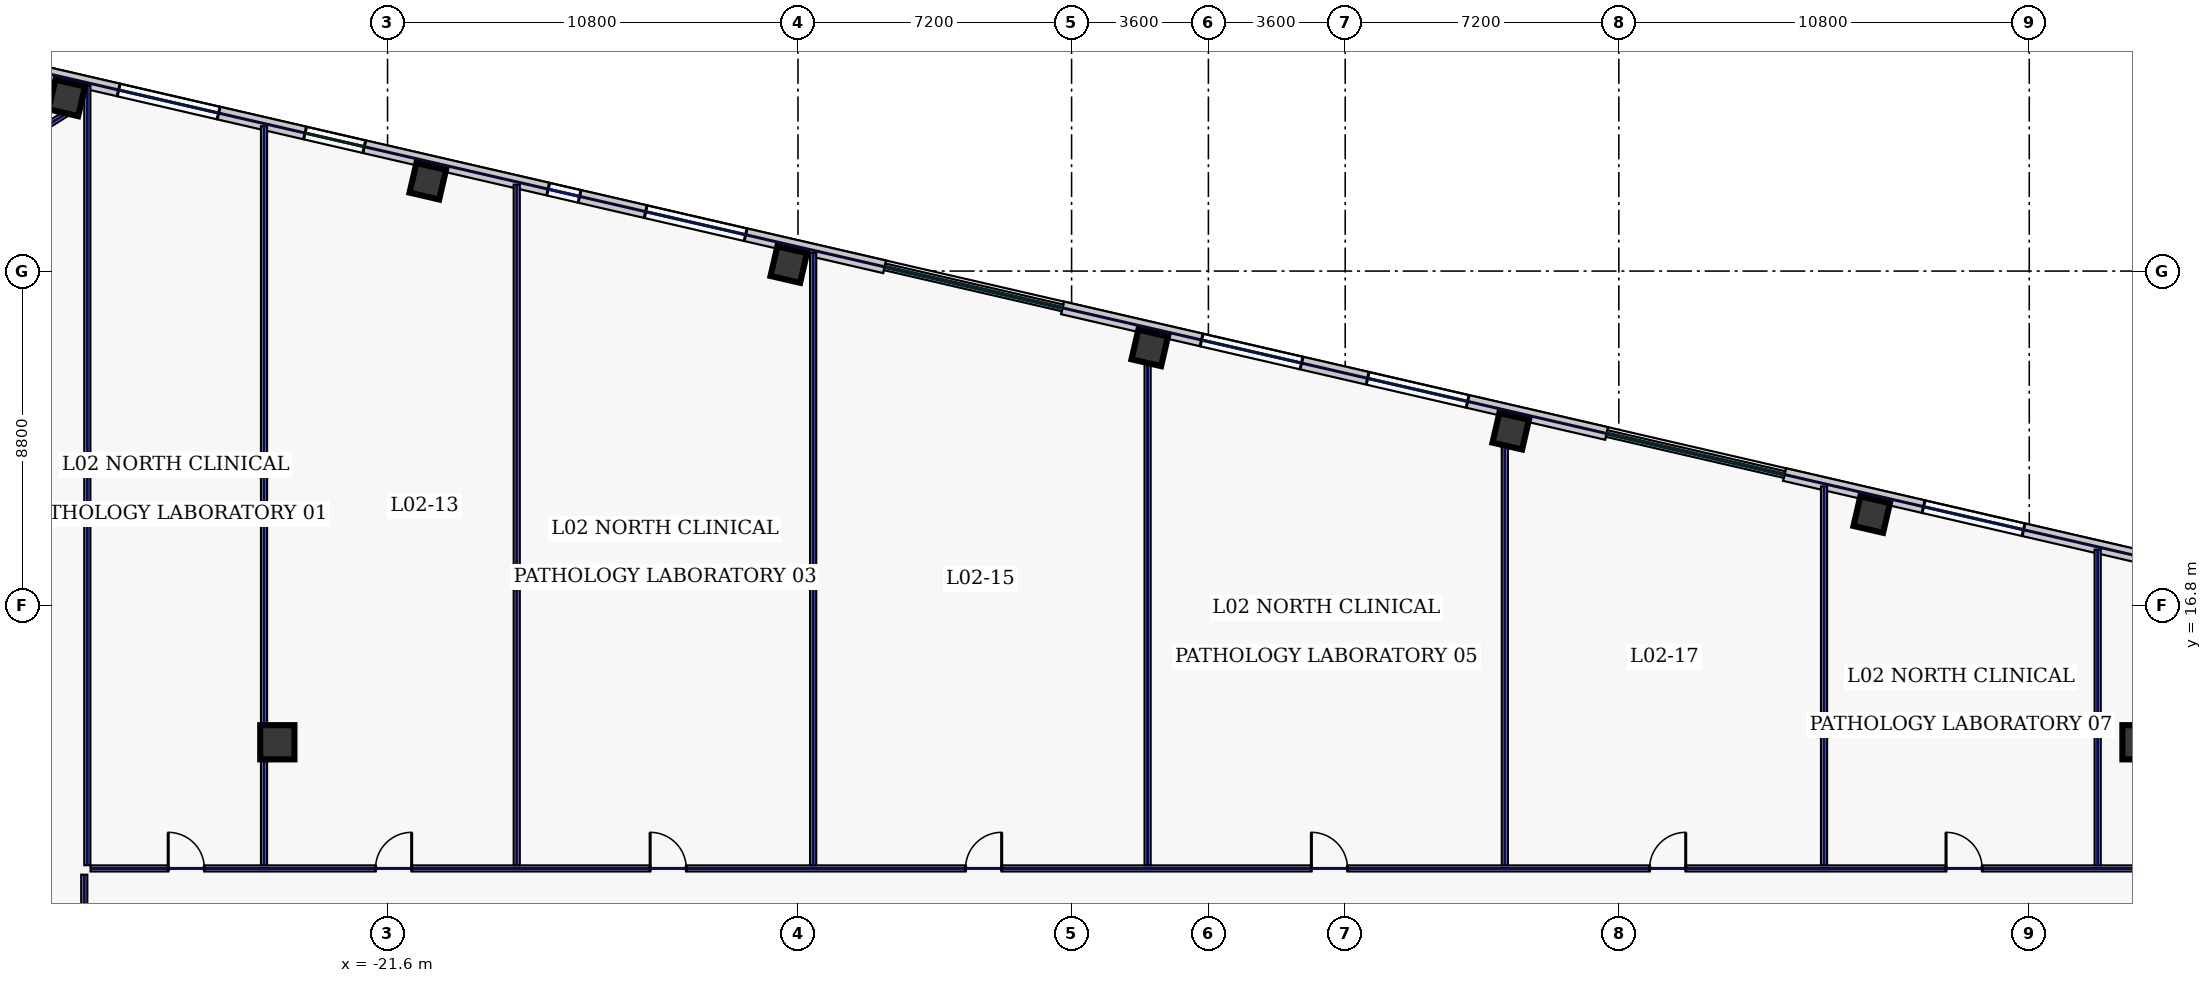
"""IFC4 building model, lengths in metres.
Left out: names, types, materials, properties, quantities, classifications, styles, units other than length and angle.
Written with IfcOpenShell. Run it as: python <this file> out.ifc"""

import sys

from ifc_helpers import new_model, si_unit, direction, frame, frame_2d, origin, origin_2d, place, context, subcontext, project, spatial, rectangle, hollow_rectangle, extrude, element, fill, save


model = new_model("IFC4")
c1 = context("Model", 3, precision=1e-05, world=origin(), true_north=direction((0.0, 1.0)))
c2 = subcontext(c1, "Body", "Model", "MODEL_VIEW")
j1 = project(units=[si_unit("LENGTHUNIT", "METRE"), si_unit("PLANEANGLEUNIT", "RADIAN")], contexts=[c1])
p1 = place(None, origin())
s1 = spatial("IfcSite", under=j1, at=p1, CompositionType="ELEMENT")
p2 = place(p1, origin())
s2 = spatial("IfcBuilding", under=s1, at=p2, CompositionType="ELEMENT")
p3 = place(p2, frame((0.0, 0.0, 13.4)))
s3 = spatial("IfcBuildingStorey", under=s2, at=p3, CompositionType="ELEMENT", Elevation=13.4)
for number, where, z_axis, x_axis in (
    (1, (-24.5, 13.2, 0.0), (0.0, 0.0, 1.0), (1.0, 0.0, 0.0)),
    (2, (24.5, 13.2, 0.0), (0.0, 0.0, 1.0), (1.0, 0.0, 0.0)),
):
    element("IfcColumn", number, at=place(p3, frame(where, z_axis=z_axis, x_axis=x_axis)), inside=s3, PredefinedType="COLUMN", context=c2, shape_type="SweptSolid", body=[
        extrude(hollow_rectangle(XDim=0.9, YDim=0.9, WallThickness=0.04, at=origin_2d()), origin(), (0.0, 0.0, 1.0), 4.7),
    ])
for number, where, z_axis, x_axis in (
    (3, (17.454, 19.192, 0.0), (0.0, 0.0, 1.0), (0.974, -0.225, 0.0)),
    (4, (7.955, 21.385, 0.0), (0.0, 0.0, 1.0), (0.974, -0.225, 0.0)),
    (5, (-1.544, 23.578, 0.0), (0.0, 0.0, 1.0), (0.974, -0.225, 0.0)),
    (6, (-11.042, 25.771, 0.0), (0.0, 0.0, 1.0), (0.974, -0.225, 0.0)),
    (7, (-20.541, 27.964, 0.0), (0.0, 0.0, 1.0), (0.974, -0.225, 0.0)),
    (8, (-30.04, 30.156, 0.0), (0.0, 0.0, 1.0), (0.974, -0.225, 0.0)),
):
    element("IfcColumn", number, at=place(p3, frame(where, z_axis=z_axis, x_axis=x_axis)), inside=s3, PredefinedType="COLUMN", context=c2, shape_type="SweptSolid", body=[
        extrude(hollow_rectangle(XDim=0.8, YDim=0.8, WallThickness=0.036, at=origin_2d()), origin(), (0.0, 0.0, 1.0), 4.7),
    ])
p4 = place(p3, frame((37.229, 15.15, 0.0), z_axis=(0.0, 0.0, 1.0), x_axis=(-0.97436993772, 0.224951604723, 0.0)))
e9 = element("IfcWall", 9, at=p4, inside=s3, PredefinedType="STANDARD", context=c2, shape_type="SweptSolid", body=[
    extrude(rectangle(XDim=22.651, YDim=0.34, at=frame_2d((11.326, 0.0))), origin(), (0.0, 0.0, 1.0), 4.7),
])
p5 = place(p4, frame((16.195, 0.0, 0.9)))
e10 = element("IfcOpeningElement", 10, at=p5, cuts=e9, PredefinedType="OPENING", context=c2, shape_type="SweptSolid", body=[
    extrude(rectangle(XDim=2.7, YDim=2.2, at=frame_2d((1.35, 1.1))), frame((0.0, 0.18, 0.0), z_axis=(0.0, -1.0, 0.0), x_axis=(1.0, 0.0, 0.0)), (0.0, 0.0, 1.0), 0.36),
])
p6 = place(p4, frame((11.711, 0.0, 0.9)))
e11 = element("IfcOpeningElement", 11, at=p6, cuts=e9, PredefinedType="OPENING", context=c2, shape_type="SweptSolid", body=[
    extrude(rectangle(XDim=0.85, YDim=1.85, at=frame_2d((0.425, 0.925))), frame((0.0, 0.18, 0.0), z_axis=(0.0, -1.0, 0.0), x_axis=(1.0, 0.0, 0.0)), (0.0, 0.0, 1.0), 0.36),
])
p7 = place(p4, frame((6.447, 0.0, 0.9)))
e12 = element("IfcOpeningElement", 12, at=p7, cuts=e9, PredefinedType="OPENING", context=c2, shape_type="SweptSolid", body=[
    extrude(rectangle(XDim=0.85, YDim=1.85, at=frame_2d((0.425, 0.925))), frame((0.0, 0.18, 0.0), z_axis=(0.0, -1.0, 0.0), x_axis=(1.0, 0.0, 0.0)), (0.0, 0.0, 1.0), 0.36),
])
p8 = place(p4, frame((1.962, 0.0, 0.9)))
e13 = element("IfcOpeningElement", 13, at=p8, cuts=e9, PredefinedType="OPENING", context=c2, shape_type="SweptSolid", body=[
    extrude(rectangle(XDim=2.7, YDim=2.2, at=frame_2d((1.35, 1.1))), frame((0.0, 0.18, 0.0), z_axis=(0.0, -1.0, 0.0), x_axis=(1.0, 0.0, 0.0)), (0.0, 0.0, 1.0), 0.36),
])
p9 = place(p3, frame((10.481, 21.325, 0.0), z_axis=(0.0, 0.0, 1.0), x_axis=(-0.974369353393, 0.2249541357, 0.0)))
e14 = element("IfcWall", 14, at=p9, inside=s3, PredefinedType="STANDARD", context=c2, shape_type="SweptSolid", body=[
    extrude(rectangle(XDim=14.697, YDim=0.34, at=frame_2d((7.349, 0.0))), origin(), (0.0, 0.0, 1.0), 4.7),
])
p10 = place(p9, frame((8.241, 0.0, 0.9)))
e15 = element("IfcOpeningElement", 15, at=p10, cuts=e14, PredefinedType="OPENING", context=c2, shape_type="SweptSolid", body=[
    extrude(rectangle(XDim=2.7, YDim=2.2, at=frame_2d((1.35, 1.1))), frame((0.0, 0.18, 0.0), z_axis=(0.0, -1.0, 0.0), x_axis=(1.0, 0.0, 0.0)), (0.0, 0.0, 1.0), 0.36),
])
p11 = place(p9, frame((3.756, 0.0, 0.9)))
e16 = element("IfcOpeningElement", 16, at=p11, cuts=e14, PredefinedType="OPENING", context=c2, shape_type="SweptSolid", body=[
    extrude(rectangle(XDim=2.7, YDim=2.2, at=frame_2d((1.35, 1.1))), frame((0.0, 0.18, 0.0), z_axis=(0.0, -1.0, 0.0), x_axis=(1.0, 0.0, 0.0)), (0.0, 0.0, 1.0), 0.36),
])
p12 = place(p3, frame((-8.517, 25.711, 0.0), z_axis=(0.0, 0.0, 1.0), x_axis=(-0.974372845456, 0.224939009598, 0.0)))
e17 = element("IfcWall", 17, at=p12, inside=s3, PredefinedType="STANDARD", context=c2, shape_type="SweptSolid", body=[
    extrude(rectangle(XDim=22.652, YDim=0.34, at=frame_2d((11.326, 0.0))), origin(), (0.0, 0.0, 1.0), 4.7),
])
p13 = place(p12, frame((17.989, 0.0, 0.9)))
e18 = element("IfcOpeningElement", 18, at=p13, cuts=e17, PredefinedType="OPENING", context=c2, shape_type="SweptSolid", body=[
    extrude(rectangle(XDim=2.7, YDim=2.2, at=frame_2d((1.35, 1.1))), frame((0.0, 0.18, 0.0), z_axis=(0.0, -1.0, 0.0), x_axis=(1.0, 0.0, 0.0)), (0.0, 0.0, 1.0), 0.36),
])
p14 = place(p12, frame((14.055, 0.0, 0.22)))
e19 = element("IfcOpeningElement", 19, at=p14, cuts=e17, PredefinedType="OPENING", context=c2, shape_type="SweptSolid", body=[
    extrude(rectangle(XDim=1.6, YDim=1.2, at=frame_2d((0.8, 0.6))), frame((0.0, 0.18, 0.0), z_axis=(0.0, -1.0, 0.0), x_axis=(1.0, 0.0, 0.0)), (0.0, 0.0, 1.0), 0.36),
])
p15 = place(p12, frame((8.241, 0.0, 0.9)))
e20 = element("IfcOpeningElement", 20, at=p15, cuts=e17, PredefinedType="OPENING", context=c2, shape_type="SweptSolid", body=[
    extrude(rectangle(XDim=0.85, YDim=1.85, at=frame_2d((0.425, 0.925))), frame((0.0, 0.18, 0.0), z_axis=(0.0, -1.0, 0.0), x_axis=(1.0, 0.0, 0.0)), (0.0, 0.0, 1.0), 0.36),
])
p16 = place(p12, frame((3.756, 0.0, 0.9)))
e21 = element("IfcOpeningElement", 21, at=p16, cuts=e17, PredefinedType="OPENING", context=c2, shape_type="SweptSolid", body=[
    extrude(rectangle(XDim=2.7, YDim=2.2, at=frame_2d((1.35, 1.1))), frame((0.0, 0.18, 0.0), z_axis=(0.0, -1.0, 0.0), x_axis=(1.0, 0.0, 0.0)), (0.0, 0.0, 1.0), 0.36),
])
p17 = place(p3, frame((-29.86, 29.868, 0.0), z_axis=(0.0, 0.0, 1.0), x_axis=(-0.848043064089, -0.529927317139, 0.0)))
e22 = element("IfcWall", 22, at=p17, inside=s3, PredefinedType="PARTITIONING", context=c2, shape_type="SweptSolid", body=[
    extrude(rectangle(XDim=7.354, YDim=0.16, at=frame_2d((3.677, 0.0))), origin(), (0.0, 0.0, 1.0), 4.7),
])
p18 = place(p3, frame((-29.58, -9.715, 0.0), z_axis=(0.0, 0.0, 1.0), x_axis=(0.0, 1.0, 0.0)))
e23 = element("IfcWall", 23, at=p18, inside=s3, PredefinedType="PARTITIONING", context=c2, shape_type="SweptSolid", body=[
    extrude(rectangle(XDim=19.43, YDim=0.16, at=frame_2d((9.715, 0.0))), origin(), (0.0, 0.0, 1.0), 4.7),
])
p19 = place(p18, frame((2.019, 0.0, 0.0)))
e24 = element("IfcOpeningElement", 24, at=p19, cuts=e23, PredefinedType="OPENING", context=c2, shape_type="SweptSolid", body=[
    extrude(rectangle(XDim=0.95, YDim=2.2, at=frame_2d((0.475, 1.1))), frame((0.0, 0.09, 0.0), z_axis=(0.0, -1.0, 0.0), x_axis=(1.0, 0.0, 0.0)), (0.0, 0.0, 1.0), 0.18),
])
p20 = place(p18, frame((6.725, 0.0, 0.0)))
e25 = element("IfcOpeningElement", 25, at=p20, cuts=e23, PredefinedType="OPENING", context=c2, shape_type="SweptSolid", body=[
    extrude(rectangle(XDim=0.95, YDim=2.2, at=frame_2d((0.475, 1.1))), frame((0.0, 0.09, 0.0), z_axis=(0.0, -1.0, 0.0), x_axis=(1.0, 0.0, 0.0)), (0.0, 0.0, 1.0), 0.18),
])
p21 = place(p18, frame((11.925, 0.0, 0.0)))
e26 = element("IfcOpeningElement", 26, at=p21, cuts=e23, PredefinedType="OPENING", context=c2, shape_type="SweptSolid", body=[
    extrude(rectangle(XDim=0.95, YDim=2.2, at=frame_2d((0.475, 1.1))), frame((0.0, 0.09, 0.0), z_axis=(0.0, -1.0, 0.0), x_axis=(1.0, 0.0, 0.0)), (0.0, 0.0, 1.0), 0.18),
])
p22 = place(p18, frame((16.631, 0.0, 0.0)))
e27 = element("IfcOpeningElement", 27, at=p22, cuts=e23, PredefinedType="OPENING", context=c2, shape_type="SweptSolid", body=[
    extrude(rectangle(XDim=0.95, YDim=2.2, at=frame_2d((0.475, 1.1))), frame((0.0, 0.09, 0.0), z_axis=(0.0, -1.0, 0.0), x_axis=(1.0, 0.0, 0.0)), (0.0, 0.0, 1.0), 0.18),
])
p23 = place(p3, frame((-29.415, 9.88, 0.0), z_axis=(0.0, 0.0, 1.0), x_axis=(1.0, 0.0, 0.0)))
e28 = element("IfcWall", 28, at=p23, inside=s3, PredefinedType="PARTITIONING", context=c2, shape_type="SweptSolid", body=[
    extrude(rectangle(XDim=58.83, YDim=0.16, at=frame_2d((29.415, 0.0))), origin(), (0.0, 0.0, 1.0), 4.7),
])
p24 = place(p23, frame((2.044, 0.0, 0.0)))
e29 = element("IfcOpeningElement", 29, at=p24, cuts=e28, PredefinedType="OPENING", context=c2, shape_type="SweptSolid", body=[
    extrude(rectangle(XDim=0.95, YDim=2.2, at=frame_2d((0.475, 1.1))), frame((0.0, 0.09, 0.0), z_axis=(0.0, -1.0, 0.0), x_axis=(1.0, 0.0, 0.0)), (0.0, 0.0, 1.0), 0.18),
])
p25 = place(p23, frame((7.5, 0.0, 0.0)))
e30 = element("IfcOpeningElement", 30, at=p25, cuts=e28, PredefinedType="OPENING", context=c2, shape_type="SweptSolid", body=[
    extrude(rectangle(XDim=0.95, YDim=2.2, at=frame_2d((0.475, 1.1))), frame((0.0, 0.09, 0.0), z_axis=(0.0, -1.0, 0.0), x_axis=(1.0, 0.0, 0.0)), (0.0, 0.0, 1.0), 0.18),
])
p26 = place(p23, frame((14.725, 0.0, 0.0)))
e31 = element("IfcOpeningElement", 31, at=p26, cuts=e28, PredefinedType="OPENING", context=c2, shape_type="SweptSolid", body=[
    extrude(rectangle(XDim=0.95, YDim=2.2, at=frame_2d((0.475, 1.1))), frame((0.0, 0.09, 0.0), z_axis=(0.0, -1.0, 0.0), x_axis=(1.0, 0.0, 0.0)), (0.0, 0.0, 1.0), 0.18),
])
p27 = place(p23, frame((23.025, 0.0, 0.0)))
e32 = element("IfcOpeningElement", 32, at=p27, cuts=e28, PredefinedType="OPENING", context=c2, shape_type="SweptSolid", body=[
    extrude(rectangle(XDim=0.95, YDim=2.2, at=frame_2d((0.475, 1.1))), frame((0.0, 0.09, 0.0), z_axis=(0.0, -1.0, 0.0), x_axis=(1.0, 0.0, 0.0)), (0.0, 0.0, 1.0), 0.18),
])
p28 = place(p23, frame((32.125, 0.0, 0.0)))
e33 = element("IfcOpeningElement", 33, at=p28, cuts=e28, PredefinedType="OPENING", context=c2, shape_type="SweptSolid", body=[
    extrude(rectangle(XDim=0.95, YDim=2.2, at=frame_2d((0.475, 1.1))), frame((0.0, 0.09, 0.0), z_axis=(0.0, -1.0, 0.0), x_axis=(1.0, 0.0, 0.0)), (0.0, 0.0, 1.0), 0.18),
])
p29 = place(p23, frame((41.025, 0.0, 0.0)))
e34 = element("IfcOpeningElement", 34, at=p29, cuts=e28, PredefinedType="OPENING", context=c2, shape_type="SweptSolid", body=[
    extrude(rectangle(XDim=0.95, YDim=2.2, at=frame_2d((0.475, 1.1))), frame((0.0, 0.09, 0.0), z_axis=(0.0, -1.0, 0.0), x_axis=(1.0, 0.0, 0.0)), (0.0, 0.0, 1.0), 0.18),
])
p30 = place(p23, frame((48.825, 0.0, 0.0)))
e35 = element("IfcOpeningElement", 35, at=p30, cuts=e28, PredefinedType="OPENING", context=c2, shape_type="SweptSolid", body=[
    extrude(rectangle(XDim=0.95, YDim=2.2, at=frame_2d((0.475, 1.1))), frame((0.0, 0.09, 0.0), z_axis=(0.0, -1.0, 0.0), x_axis=(1.0, 0.0, 0.0)), (0.0, 0.0, 1.0), 0.18),
])
p31 = place(p23, frame((55.281, 0.0, 0.0)))
e36 = element("IfcOpeningElement", 36, at=p31, cuts=e28, PredefinedType="OPENING", context=c2, shape_type="SweptSolid", body=[
    extrude(rectangle(XDim=0.95, YDim=2.2, at=frame_2d((0.475, 1.1))), frame((0.0, 0.09, 0.0), z_axis=(0.0, -1.0, 0.0), x_axis=(1.0, 0.0, 0.0)), (0.0, 0.0, 1.0), 0.18),
])
p32 = place(p3, frame((-29.5, 9.965, 0.0), z_axis=(0.0, 0.0, 1.0), x_axis=(0.0, 1.0, 0.0)))
e37 = element("IfcWall", 37, at=p32, inside=s3, PredefinedType="PARTITIONING", context=c2, shape_type="SweptSolid", body=[
    extrude(rectangle(XDim=20.519, YDim=0.16, at=frame_2d((10.259, 0.0))), origin(), (0.0, 0.0, 1.0), 4.7),
])
p33 = place(p3, frame((-24.85, 9.965, 0.0), z_axis=(0.0, 0.0, 1.0), x_axis=(0.0, 1.0, 0.0)))
e38 = element("IfcWall", 38, at=p33, inside=s3, PredefinedType="PARTITIONING", context=c2, shape_type="SweptSolid", body=[
    extrude(rectangle(XDim=19.445, YDim=0.16, at=frame_2d((9.723, 0.0))), origin(), (0.0, 0.0, 1.0), 4.7),
])
p34 = place(p3, frame((-18.2, 9.965, 0.0), z_axis=(0.0, 0.0, 1.0), x_axis=(0.0, 1.0, 0.0)))
e39 = element("IfcWall", 39, at=p34, inside=s3, PredefinedType="PARTITIONING", context=c2, shape_type="SweptSolid", body=[
    extrude(rectangle(XDim=17.91, YDim=0.16, at=frame_2d((8.955, 0.0))), origin(), (0.0, 0.0, 1.0), 4.7),
])
p35 = place(p3, frame((-10.4, 9.965, 0.0), z_axis=(0.0, 0.0, 1.0), x_axis=(0.0, 1.0, 0.0)))
e40 = element("IfcWall", 40, at=p35, inside=s3, PredefinedType="PARTITIONING", context=c2, shape_type="SweptSolid", body=[
    extrude(rectangle(XDim=16.109, YDim=0.16, at=frame_2d((8.054, 0.0))), origin(), (0.0, 0.0, 1.0), 4.7),
])
p36 = place(p3, frame((-1.6, 9.965, 0.0), z_axis=(0.0, 0.0, 1.0), x_axis=(0.0, 1.0, 0.0)))
e41 = element("IfcWall", 41, at=p36, inside=s3, PredefinedType="PARTITIONING", context=c2, shape_type="SweptSolid", body=[
    extrude(rectangle(XDim=14.077, YDim=0.16, at=frame_2d((7.039, 0.0))), origin(), (0.0, 0.0, 1.0), 4.195),
])
p37 = place(p3, frame((7.8, 9.965, 0.0), z_axis=(0.0, 0.0, 1.0), x_axis=(0.0, 1.0, 0.0)))
e42 = element("IfcWall", 42, at=p37, inside=s3, PredefinedType="PARTITIONING", context=c2, shape_type="SweptSolid", body=[
    extrude(rectangle(XDim=11.907, YDim=0.16, at=frame_2d((5.954, 0.0))), origin(), (0.0, 0.0, 1.0), 4.7),
])
p38 = place(p3, frame((16.2, 9.965, 0.0), z_axis=(0.0, 0.0, 1.0), x_axis=(0.0, 1.0, 0.0)))
e43 = element("IfcWall", 43, at=p38, inside=s3, PredefinedType="PARTITIONING", context=c2, shape_type="SweptSolid", body=[
    extrude(rectangle(XDim=9.968, YDim=0.16, at=frame_2d((4.984, 0.0))), origin(), (0.0, 0.0, 1.0), 4.7),
])
p39 = place(p3, frame((23.4, 9.965, 0.0), z_axis=(0.0, 0.0, 1.0), x_axis=(0.0, 1.0, 0.0)))
e44 = element("IfcWall", 44, at=p39, inside=s3, PredefinedType="PARTITIONING", context=c2, shape_type="SweptSolid", body=[
    extrude(rectangle(XDim=8.306, YDim=0.16, at=frame_2d((4.153, 0.0))), origin(), (0.0, 0.0, 1.0), 4.7),
])
p40 = place(p5, origin())
e45 = element("IfcWindow", 45, at=p40, inside=s3, PartitioningType="SINGLE_PANEL", PredefinedType="WINDOW", context=c2, shape_type="SweptSolid", body=[
    extrude(rectangle(XDim=2.7, YDim=2.2, at=frame_2d((1.35, 1.1))), frame((0.0, 0.03, 0.0), z_axis=(0.0, -1.0, 0.0), x_axis=(1.0, 0.0, 0.0)), (0.0, 0.0, 1.0), 0.06),
])
fill(e10, e45)
p41 = place(p10, origin())
e46 = element("IfcWindow", 46, at=p41, inside=s3, PartitioningType="SINGLE_PANEL", PredefinedType="WINDOW", context=c2, shape_type="SweptSolid", body=[
    extrude(rectangle(XDim=2.7, YDim=2.2, at=frame_2d((1.35, 1.1))), frame((0.0, 0.03, 0.0), z_axis=(0.0, -1.0, 0.0), x_axis=(1.0, 0.0, 0.0)), (0.0, 0.0, 1.0), 0.06),
])
fill(e15, e46)
p42 = place(p11, origin())
e47 = element("IfcWindow", 47, at=p42, inside=s3, PartitioningType="SINGLE_PANEL", PredefinedType="WINDOW", context=c2, shape_type="SweptSolid", body=[
    extrude(rectangle(XDim=2.7, YDim=2.2, at=frame_2d((1.35, 1.1))), frame((0.0, 0.03, 0.0), z_axis=(0.0, -1.0, 0.0), x_axis=(1.0, 0.0, 0.0)), (0.0, 0.0, 1.0), 0.06),
])
fill(e16, e47)
p43 = place(p13, origin())
e48 = element("IfcWindow", 48, at=p43, inside=s3, PartitioningType="SINGLE_PANEL", PredefinedType="WINDOW", context=c2, shape_type="SweptSolid", body=[
    extrude(rectangle(XDim=2.7, YDim=2.2, at=frame_2d((1.35, 1.1))), frame((0.0, 0.03, 0.0), z_axis=(0.0, -1.0, 0.0), x_axis=(1.0, 0.0, 0.0)), (0.0, 0.0, 1.0), 0.06),
])
fill(e18, e48)
p44 = place(p14, origin())
e49 = element("IfcWindow", 49, at=p44, inside=s3, PartitioningType="SINGLE_PANEL", PredefinedType="WINDOW", context=c2, shape_type="SweptSolid", body=[
    extrude(rectangle(XDim=1.6, YDim=1.2, at=frame_2d((0.8, 0.6))), frame((0.0, 0.03, 0.0), z_axis=(0.0, -1.0, 0.0), x_axis=(1.0, 0.0, 0.0)), (0.0, 0.0, 1.0), 0.06),
])
fill(e19, e49)
p45 = place(p15, origin())
e50 = element("IfcWindow", 50, at=p45, inside=s3, PartitioningType="SINGLE_PANEL", PredefinedType="WINDOW", context=c2, shape_type="SweptSolid", body=[
    extrude(rectangle(XDim=0.85, YDim=1.85, at=frame_2d((0.425, 0.925))), frame((0.0, 0.03, 0.0), z_axis=(0.0, -1.0, 0.0), x_axis=(1.0, 0.0, 0.0)), (0.0, 0.0, 1.0), 0.06),
])
fill(e20, e50)
p46 = place(p16, origin())
e51 = element("IfcWindow", 51, at=p46, inside=s3, PartitioningType="SINGLE_PANEL", PredefinedType="WINDOW", context=c2, shape_type="SweptSolid", body=[
    extrude(rectangle(XDim=2.7, YDim=2.2, at=frame_2d((1.35, 1.1))), frame((0.0, 0.03, 0.0), z_axis=(0.0, -1.0, 0.0), x_axis=(1.0, 0.0, 0.0)), (0.0, 0.0, 1.0), 0.06),
])
fill(e21, e51)
p47 = place(p24, origin())
e52 = element("IfcDoor", 52, at=p47, inside=s3, OperationType="SINGLE_SWING_LEFT", PredefinedType="DOOR", context=c2, shape_type="SweptSolid", body=[
    extrude(rectangle(XDim=0.95, YDim=2.2, at=frame_2d((0.475, 1.1))), frame((0.0, 0.025, 0.0), z_axis=(0.0, -1.0, 0.0), x_axis=(1.0, 0.0, 0.0)), (0.0, 0.0, 1.0), 0.05),
])
fill(e29, e52)
p48 = place(p25, origin())
e53 = element("IfcDoor", 53, at=p48, inside=s3, OperationType="SINGLE_SWING_RIGHT", PredefinedType="DOOR", context=c2, shape_type="SweptSolid", body=[
    extrude(rectangle(XDim=0.95, YDim=2.2, at=frame_2d((0.475, 1.1))), frame((0.0, 0.025, 0.0), z_axis=(0.0, -1.0, 0.0), x_axis=(1.0, 0.0, 0.0)), (0.0, 0.0, 1.0), 0.05),
])
fill(e30, e53)
p49 = place(p26, origin())
e54 = element("IfcDoor", 54, at=p49, inside=s3, OperationType="SINGLE_SWING_LEFT", PredefinedType="DOOR", context=c2, shape_type="SweptSolid", body=[
    extrude(rectangle(XDim=0.95, YDim=2.2, at=frame_2d((0.475, 1.1))), frame((0.0, 0.025, 0.0), z_axis=(0.0, -1.0, 0.0), x_axis=(1.0, 0.0, 0.0)), (0.0, 0.0, 1.0), 0.05),
])
fill(e31, e54)
p50 = place(p27, origin())
e55 = element("IfcDoor", 55, at=p50, inside=s3, OperationType="SINGLE_SWING_RIGHT", PredefinedType="DOOR", context=c2, shape_type="SweptSolid", body=[
    extrude(rectangle(XDim=0.95, YDim=2.2, at=frame_2d((0.475, 1.1))), frame((0.0, 0.025, 0.0), z_axis=(0.0, -1.0, 0.0), x_axis=(1.0, 0.0, 0.0)), (0.0, 0.0, 1.0), 0.05),
])
fill(e32, e55)
p51 = place(p28, origin())
e56 = element("IfcDoor", 56, at=p51, inside=s3, OperationType="SINGLE_SWING_LEFT", PredefinedType="DOOR", context=c2, shape_type="SweptSolid", body=[
    extrude(rectangle(XDim=0.95, YDim=2.2, at=frame_2d((0.475, 1.1))), frame((0.0, 0.025, 0.0), z_axis=(0.0, -1.0, 0.0), x_axis=(1.0, 0.0, 0.0)), (0.0, 0.0, 1.0), 0.05),
])
fill(e33, e56)
p52 = place(p29, origin())
e57 = element("IfcDoor", 57, at=p52, inside=s3, OperationType="SINGLE_SWING_RIGHT", PredefinedType="DOOR", context=c2, shape_type="SweptSolid", body=[
    extrude(rectangle(XDim=0.95, YDim=2.2, at=frame_2d((0.475, 1.1))), frame((0.0, 0.025, 0.0), z_axis=(0.0, -1.0, 0.0), x_axis=(1.0, 0.0, 0.0)), (0.0, 0.0, 1.0), 0.05),
])
fill(e34, e57)
p53 = place(p30, origin())
e58 = element("IfcDoor", 58, at=p53, inside=s3, OperationType="SINGLE_SWING_LEFT", PredefinedType="DOOR", context=c2, shape_type="SweptSolid", body=[
    extrude(rectangle(XDim=0.95, YDim=2.2, at=frame_2d((0.475, 1.1))), frame((0.0, 0.025, 0.0), z_axis=(0.0, -1.0, 0.0), x_axis=(1.0, 0.0, 0.0)), (0.0, 0.0, 1.0), 0.05),
])
fill(e35, e58)
save(model, sys.argv[1])
